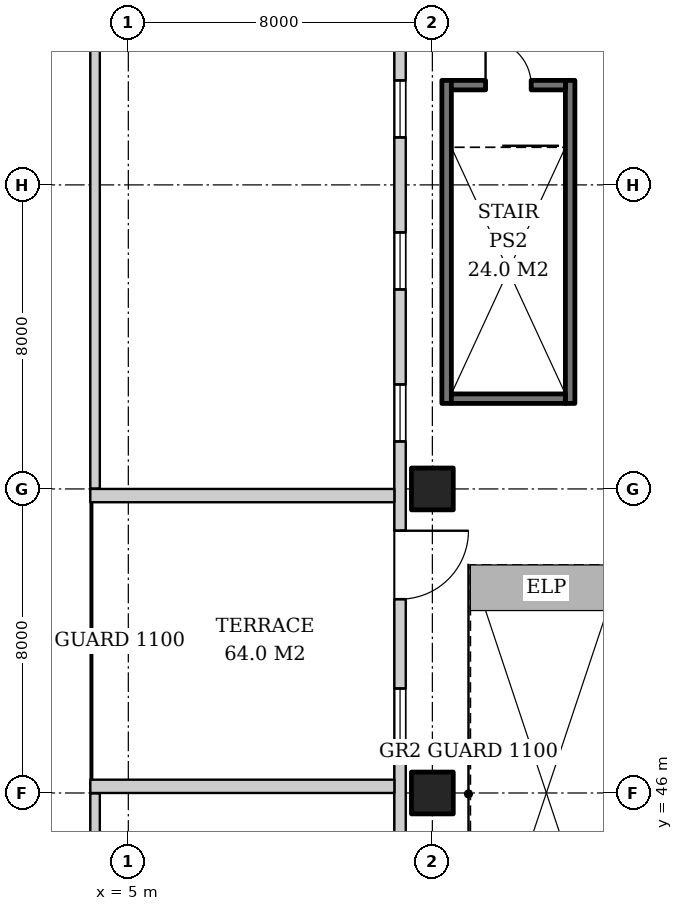
"""IFC4 building model, lengths in metres.
Left out: names, types, materials, properties, quantities, classifications, styles, units other than length and angle.
Written with IfcOpenShell. Run it as: python <this file> out.ifc"""

import sys

from ifc_helpers import new_model, si_unit, direction, frame, frame_2d, origin, origin_2d, place, context, subcontext, project, spatial, rectangle, extrude, element, fill, save


model = new_model("IFC4")
c1 = context("Model", 3, precision=1e-05, world=origin(), true_north=direction((0.0, 1.0)))
c2 = subcontext(c1, "Body", "Model", "MODEL_VIEW")
j1 = project(units=[si_unit("LENGTHUNIT", "METRE"), si_unit("PLANEANGLEUNIT", "RADIAN")], contexts=[c1])
p1 = place(None, origin())
s1 = spatial("IfcSite", under=j1, at=p1, CompositionType="ELEMENT")
p2 = place(p1, origin())
s2 = spatial("IfcBuilding", under=s1, at=p2, CompositionType="ELEMENT")
p3 = place(p2, frame((0.0, 0.0, 6.0)))
s3 = spatial("IfcBuildingStorey", under=s2, at=p3, CompositionType="ELEMENT", Elevation=6.0)
for number, where, z_axis, x_axis in (
    (1, (13.0, 46.0, 0.0), (0.0, 0.0, 1.0), (1.0, 0.0, 0.0)),
    (2, (13.0, 54.0, 0.0), (0.0, 0.0, 1.0), (1.0, 0.0, 0.0)),
):
    element("IfcColumn", number, at=place(p3, frame(where, z_axis=z_axis, x_axis=x_axis)), inside=s3, PredefinedType="COLUMN", context=c2, shape_type="SweptSolid", body=[
        extrude(rectangle(XDim=1.1, YDim=1.1, at=origin_2d()), origin(), (0.0, 0.0, 1.0), 5.0),
    ])
p4 = place(p3, frame((12.15, 86.7, 0.0), z_axis=(0.0, 0.0, 1.0), x_axis=(0.0, -1.0, 0.0)))
e3 = element("IfcWall", 3, at=p4, inside=s3, PredefinedType="SOLIDWALL", context=c2, shape_type="SweptSolid", body=[
    extrude(rectangle(XDim=73.4, YDim=0.3, at=frame_2d((36.7, 0.0))), origin(), (0.0, 0.0, 1.0), 4.7),
])
p5 = place(p4, frame((1.2, 0.0, 0.9)))
e4 = element("IfcOpeningElement", 4, at=p5, cuts=e3, PredefinedType="OPENING", context=c2, shape_type="SweptSolid", body=[
    extrude(rectangle(XDim=1.5, YDim=3.2, at=frame_2d((0.75, 1.6))), frame((0.0, 0.16, 0.0), z_axis=(0.0, -1.0, 0.0), x_axis=(1.0, 0.0, 0.0)), (0.0, 0.0, 1.0), 0.32),
])
p6 = place(p4, frame((5.7, 0.0, 0.9)))
e5 = element("IfcOpeningElement", 5, at=p6, cuts=e3, PredefinedType="OPENING", context=c2, shape_type="SweptSolid", body=[
    extrude(rectangle(XDim=1.5, YDim=3.2, at=frame_2d((0.75, 1.6))), frame((0.0, 0.16, 0.0), z_axis=(0.0, -1.0, 0.0), x_axis=(1.0, 0.0, 0.0)), (0.0, 0.0, 1.0), 0.32),
])
p7 = place(p4, frame((9.95, 0.0, 0.9)))
e6 = element("IfcOpeningElement", 6, at=p7, cuts=e3, PredefinedType="OPENING", context=c2, shape_type="SweptSolid", body=[
    extrude(rectangle(XDim=1.5, YDim=3.2, at=frame_2d((0.75, 1.6))), frame((0.0, 0.16, 0.0), z_axis=(0.0, -1.0, 0.0), x_axis=(1.0, 0.0, 0.0)), (0.0, 0.0, 1.0), 0.32),
])
p8 = place(p4, frame((13.95, 0.0, 0.9)))
e7 = element("IfcOpeningElement", 7, at=p8, cuts=e3, PredefinedType="OPENING", context=c2, shape_type="SweptSolid", body=[
    extrude(rectangle(XDim=1.5, YDim=3.2, at=frame_2d((0.75, 1.6))), frame((0.0, 0.16, 0.0), z_axis=(0.0, -1.0, 0.0), x_axis=(1.0, 0.0, 0.0)), (0.0, 0.0, 1.0), 0.32),
])
p9 = place(p4, frame((17.95, 0.0, 0.9)))
e8 = element("IfcOpeningElement", 8, at=p9, cuts=e3, PredefinedType="OPENING", context=c2, shape_type="SweptSolid", body=[
    extrude(rectangle(XDim=1.5, YDim=3.2, at=frame_2d((0.75, 1.6))), frame((0.0, 0.16, 0.0), z_axis=(0.0, -1.0, 0.0), x_axis=(1.0, 0.0, 0.0)), (0.0, 0.0, 1.0), 0.32),
])
p10 = place(p4, frame((21.95, 0.0, 0.9)))
e9 = element("IfcOpeningElement", 9, at=p10, cuts=e3, PredefinedType="OPENING", context=c2, shape_type="SweptSolid", body=[
    extrude(rectangle(XDim=1.5, YDim=3.2, at=frame_2d((0.75, 1.6))), frame((0.0, 0.16, 0.0), z_axis=(0.0, -1.0, 0.0), x_axis=(1.0, 0.0, 0.0)), (0.0, 0.0, 1.0), 0.32),
])
p11 = place(p4, frame((25.95, 0.0, 0.9)))
e10 = element("IfcOpeningElement", 10, at=p11, cuts=e3, PredefinedType="OPENING", context=c2, shape_type="SweptSolid", body=[
    extrude(rectangle(XDim=1.5, YDim=3.2, at=frame_2d((0.75, 1.6))), frame((0.0, 0.16, 0.0), z_axis=(0.0, -1.0, 0.0), x_axis=(1.0, 0.0, 0.0)), (0.0, 0.0, 1.0), 0.32),
])
p12 = place(p4, frame((29.95, 0.0, 0.9)))
e11 = element("IfcOpeningElement", 11, at=p12, cuts=e3, PredefinedType="OPENING", context=c2, shape_type="SweptSolid", body=[
    extrude(rectangle(XDim=1.5, YDim=3.2, at=frame_2d((0.75, 1.6))), frame((0.0, 0.16, 0.0), z_axis=(0.0, -1.0, 0.0), x_axis=(1.0, 0.0, 0.0)), (0.0, 0.0, 1.0), 0.32),
])
p13 = place(p4, frame((33.8, 0.0, 0.0)))
e12 = element("IfcOpeningElement", 12, at=p13, cuts=e3, PredefinedType="OPENING", context=c2, shape_type="SweptSolid", body=[
    extrude(rectangle(XDim=1.8, YDim=2.4, at=frame_2d((0.9, 1.2))), frame((0.0, 0.16, 0.0), z_axis=(0.0, -1.0, 0.0), x_axis=(1.0, 0.0, 0.0)), (0.0, 0.0, 1.0), 0.32),
])
p14 = place(p4, frame((37.95, 0.0, 0.9)))
e13 = element("IfcOpeningElement", 13, at=p14, cuts=e3, PredefinedType="OPENING", context=c2, shape_type="SweptSolid", body=[
    extrude(rectangle(XDim=1.5, YDim=3.2, at=frame_2d((0.75, 1.6))), frame((0.0, 0.16, 0.0), z_axis=(0.0, -1.0, 0.0), x_axis=(1.0, 0.0, 0.0)), (0.0, 0.0, 1.0), 0.32),
])
p15 = place(p4, frame((41.95, 0.0, 0.9)))
e14 = element("IfcOpeningElement", 14, at=p15, cuts=e3, PredefinedType="OPENING", context=c2, shape_type="SweptSolid", body=[
    extrude(rectangle(XDim=1.5, YDim=3.2, at=frame_2d((0.75, 1.6))), frame((0.0, 0.16, 0.0), z_axis=(0.0, -1.0, 0.0), x_axis=(1.0, 0.0, 0.0)), (0.0, 0.0, 1.0), 0.32),
])
p16 = place(p4, frame((45.95, 0.0, 0.9)))
e15 = element("IfcOpeningElement", 15, at=p16, cuts=e3, PredefinedType="OPENING", context=c2, shape_type="SweptSolid", body=[
    extrude(rectangle(XDim=1.5, YDim=3.2, at=frame_2d((0.75, 1.6))), frame((0.0, 0.16, 0.0), z_axis=(0.0, -1.0, 0.0), x_axis=(1.0, 0.0, 0.0)), (0.0, 0.0, 1.0), 0.32),
])
p17 = place(p4, frame((49.95, 0.0, 0.9)))
e16 = element("IfcOpeningElement", 16, at=p17, cuts=e3, PredefinedType="OPENING", context=c2, shape_type="SweptSolid", body=[
    extrude(rectangle(XDim=1.5, YDim=3.2, at=frame_2d((0.75, 1.6))), frame((0.0, 0.16, 0.0), z_axis=(0.0, -1.0, 0.0), x_axis=(1.0, 0.0, 0.0)), (0.0, 0.0, 1.0), 0.32),
])
p18 = place(p4, frame((53.95, 0.0, 0.9)))
e17 = element("IfcOpeningElement", 17, at=p18, cuts=e3, PredefinedType="OPENING", context=c2, shape_type="SweptSolid", body=[
    extrude(rectangle(XDim=1.5, YDim=3.2, at=frame_2d((0.75, 1.6))), frame((0.0, 0.16, 0.0), z_axis=(0.0, -1.0, 0.0), x_axis=(1.0, 0.0, 0.0)), (0.0, 0.0, 1.0), 0.32),
])
p19 = place(p4, frame((57.95, 0.0, 0.9)))
e18 = element("IfcOpeningElement", 18, at=p19, cuts=e3, PredefinedType="OPENING", context=c2, shape_type="SweptSolid", body=[
    extrude(rectangle(XDim=1.5, YDim=3.2, at=frame_2d((0.75, 1.6))), frame((0.0, 0.16, 0.0), z_axis=(0.0, -1.0, 0.0), x_axis=(1.0, 0.0, 0.0)), (0.0, 0.0, 1.0), 0.32),
])
p20 = place(p4, frame((61.95, 0.0, 0.9)))
e19 = element("IfcOpeningElement", 19, at=p20, cuts=e3, PredefinedType="OPENING", context=c2, shape_type="SweptSolid", body=[
    extrude(rectangle(XDim=1.5, YDim=3.2, at=frame_2d((0.75, 1.6))), frame((0.0, 0.16, 0.0), z_axis=(0.0, -1.0, 0.0), x_axis=(1.0, 0.0, 0.0)), (0.0, 0.0, 1.0), 0.32),
])
p21 = place(p4, frame((66.2, 0.0, 0.9)))
e20 = element("IfcOpeningElement", 20, at=p21, cuts=e3, PredefinedType="OPENING", context=c2, shape_type="SweptSolid", body=[
    extrude(rectangle(XDim=1.5, YDim=3.2, at=frame_2d((0.75, 1.6))), frame((0.0, 0.16, 0.0), z_axis=(0.0, -1.0, 0.0), x_axis=(1.0, 0.0, 0.0)), (0.0, 0.0, 1.0), 0.32),
])
p22 = place(p4, frame((70.7, 0.0, 0.9)))
e21 = element("IfcOpeningElement", 21, at=p22, cuts=e3, PredefinedType="OPENING", context=c2, shape_type="SweptSolid", body=[
    extrude(rectangle(XDim=1.5, YDim=3.2, at=frame_2d((0.75, 1.6))), frame((0.0, 0.16, 0.0), z_axis=(0.0, -1.0, 0.0), x_axis=(1.0, 0.0, 0.0)), (0.0, 0.0, 1.0), 0.32),
])
for number, where, z_axis, x_axis in (
    (22, (4.125, 5.25, 0.0), (0.0, 0.0, 1.0), (0.0, 1.0, 0.0)),
    (23, (4.125, 54.01, 0.0), (0.0, 0.0, 1.0), (0.0, 1.0, 0.0)),
):
    element("IfcWall", number, at=place(p3, frame(where, z_axis=z_axis, x_axis=x_axis)), inside=s3, PredefinedType="PARAPET", context=c2, shape_type="SweptSolid", body=[
        extrude(rectangle(XDim=40.74, YDim=0.25, at=frame_2d((20.37, 0.0))), origin(), (0.0, 0.0, 1.0), 1.1),
    ])
for number, where, z_axis, x_axis in (
    (24, (4.0, 46.175, 0.0), (0.0, 0.0, 1.0), (1.0, 0.0, 0.0)),
    (25, (4.0, 53.825, 0.0), (0.0, 0.0, 1.0), (1.0, 0.0, 0.0)),
):
    element("IfcWall", number, at=place(p3, frame(where, z_axis=z_axis, x_axis=x_axis)), inside=s3, PredefinedType="PARAPET", context=c2, shape_type="SweptSolid", body=[
        extrude(rectangle(XDim=8.0, YDim=0.35, at=frame_2d((4.0, 0.0))), origin(), (0.0, 0.0, 1.0), 1.1),
    ])
for number, where, z_axis, x_axis in (
    (26, (13.375, 56.25, 0.0), (0.0, 0.0, 1.0), (0.0, 1.0, 0.0)),
    (27, (16.625, 56.25, 0.0), (0.0, 0.0, 1.0), (0.0, 1.0, 0.0)),
):
    element("IfcWall", number, at=place(p3, frame(where, z_axis=z_axis, x_axis=x_axis)), inside=s3, PredefinedType="SOLIDWALL", context=c2, shape_type="SweptSolid", body=[
        extrude(rectangle(XDim=8.5, YDim=0.25, at=frame_2d((4.25, 0.0))), origin(), (0.0, 0.0, 1.0), 4.7),
    ])
p23 = place(p3, frame((13.5, 56.375, 0.0), z_axis=(0.0, 0.0, 1.0), x_axis=(1.0, 0.0, 0.0)))
e28 = element("IfcWall", 28, at=p23, inside=s3, PredefinedType="SOLIDWALL", context=c2, shape_type="SweptSolid", body=[
    extrude(rectangle(XDim=3.0, YDim=0.25, at=frame_2d((1.5, 0.0))), origin(), (0.0, 0.0, 1.0), 4.7),
])
p24 = place(p3, frame((13.5, 64.625, 0.0), z_axis=(0.0, 0.0, 1.0), x_axis=(1.0, 0.0, 0.0)))
e29 = element("IfcWall", 29, at=p24, inside=s3, PredefinedType="SOLIDWALL", context=c2, shape_type="SweptSolid", body=[
    extrude(rectangle(XDim=3.0, YDim=0.25, at=frame_2d((1.5, 0.0))), origin(), (0.0, 0.0, 1.0), 4.7),
])
p25 = place(p24, frame((0.9, 0.0, 0.0)))
e30 = element("IfcOpeningElement", 30, at=p25, cuts=e29, PredefinedType="OPENING", context=c2, shape_type="SweptSolid", body=[
    extrude(rectangle(XDim=1.2, YDim=2.1, at=frame_2d((0.6, 1.05))), frame((0.0, 0.135, 0.0), z_axis=(0.0, -1.0, 0.0), x_axis=(1.0, 0.0, 0.0)), (0.0, 0.0, 1.0), 0.27),
])
p26 = place(p10, origin())
e31 = element("IfcWindow", 31, at=p26, inside=s3, PartitioningType="SINGLE_PANEL", PredefinedType="WINDOW", context=c2, shape_type="SweptSolid", body=[
    extrude(rectangle(XDim=1.5, YDim=3.2, at=frame_2d((0.75, 1.6))), frame((0.0, 0.03, 0.0), z_axis=(0.0, -1.0, 0.0), x_axis=(1.0, 0.0, 0.0)), (0.0, 0.0, 1.0), 0.06),
])
fill(e9, e31)
p27 = place(p11, origin())
e32 = element("IfcWindow", 32, at=p27, inside=s3, PartitioningType="SINGLE_PANEL", PredefinedType="WINDOW", context=c2, shape_type="SweptSolid", body=[
    extrude(rectangle(XDim=1.5, YDim=3.2, at=frame_2d((0.75, 1.6))), frame((0.0, 0.03, 0.0), z_axis=(0.0, -1.0, 0.0), x_axis=(1.0, 0.0, 0.0)), (0.0, 0.0, 1.0), 0.06),
])
fill(e10, e32)
p28 = place(p12, origin())
e33 = element("IfcWindow", 33, at=p28, inside=s3, PartitioningType="SINGLE_PANEL", PredefinedType="WINDOW", context=c2, shape_type="SweptSolid", body=[
    extrude(rectangle(XDim=1.5, YDim=3.2, at=frame_2d((0.75, 1.6))), frame((0.0, 0.03, 0.0), z_axis=(0.0, -1.0, 0.0), x_axis=(1.0, 0.0, 0.0)), (0.0, 0.0, 1.0), 0.06),
])
fill(e11, e33)
p29 = place(p13, origin())
e34 = element("IfcDoor", 34, at=p29, inside=s3, OperationType="DOUBLE_DOOR_SINGLE_SWING", PredefinedType="DOOR", context=c2, shape_type="SweptSolid", body=[
    extrude(rectangle(XDim=1.8, YDim=2.4, at=frame_2d((0.9, 1.2))), frame((0.0, 0.025, 0.0), z_axis=(0.0, -1.0, 0.0), x_axis=(1.0, 0.0, 0.0)), (0.0, 0.0, 1.0), 0.05),
])
fill(e12, e34)
p30 = place(p14, origin())
e35 = element("IfcWindow", 35, at=p30, inside=s3, PartitioningType="SINGLE_PANEL", PredefinedType="WINDOW", context=c2, shape_type="SweptSolid", body=[
    extrude(rectangle(XDim=1.5, YDim=3.2, at=frame_2d((0.75, 1.6))), frame((0.0, 0.03, 0.0), z_axis=(0.0, -1.0, 0.0), x_axis=(1.0, 0.0, 0.0)), (0.0, 0.0, 1.0), 0.06),
])
fill(e13, e35)
p31 = place(p25, origin())
e36 = element("IfcDoor", 36, at=p31, inside=s3, OperationType="SINGLE_SWING_LEFT", PredefinedType="DOOR", context=c2, shape_type="SweptSolid", body=[
    extrude(rectangle(XDim=1.2, YDim=2.1, at=frame_2d((0.6, 1.05))), frame((0.0, 0.025, 0.0), z_axis=(0.0, -1.0, 0.0), x_axis=(1.0, 0.0, 0.0)), (0.0, 0.0, 1.0), 0.05),
])
fill(e30, e36)
save(model, sys.argv[1])
